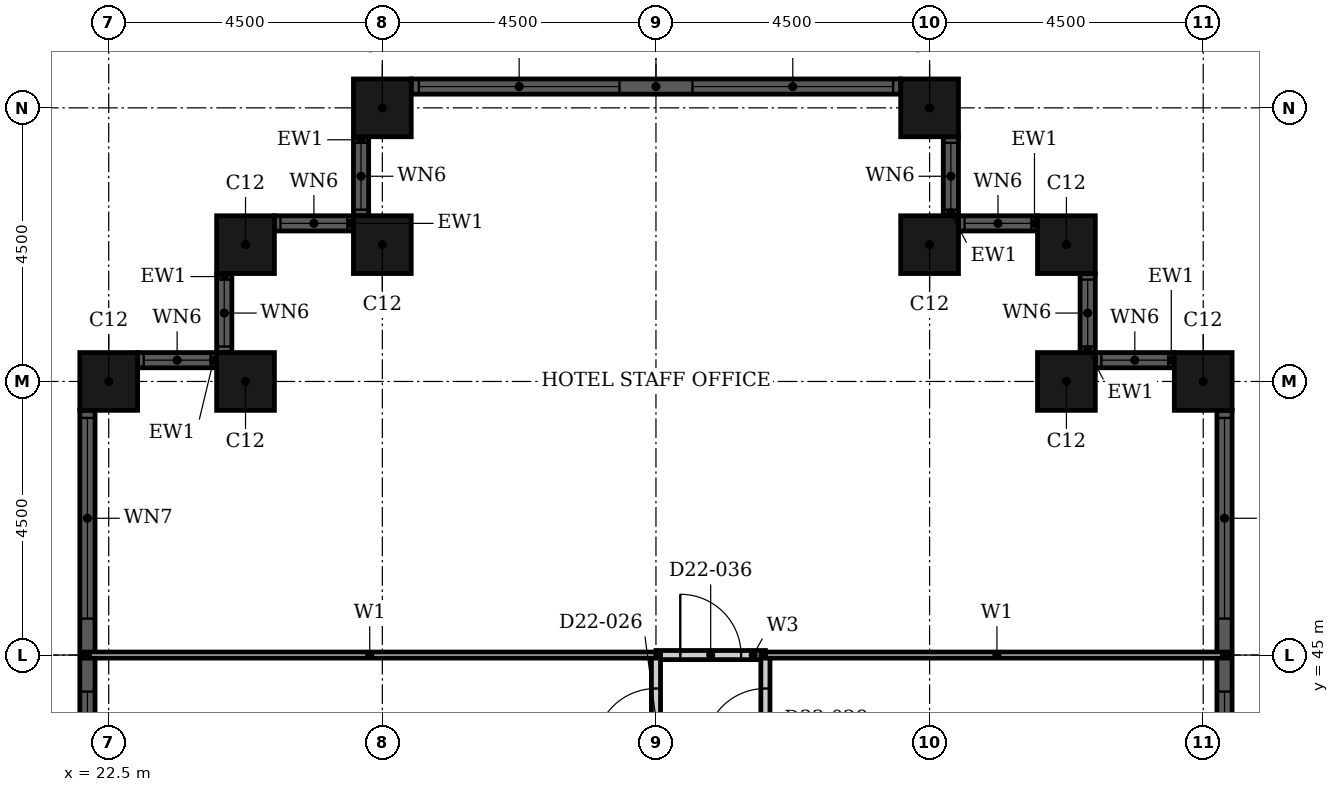
"""IFC4 building model, lengths in metres.
Left out: names, types, materials, properties, quantities, classifications, styles, units other than length and angle.
Written with IfcOpenShell. Run it as: python <this file> out.ifc"""

import sys

from ifc_helpers import new_model, si_unit, direction, frame, frame_2d, origin, origin_2d, place, context, subcontext, project, spatial, rectangle, hollow_rectangle, extrude, element, fill, save


model = new_model("IFC4")
c1 = context("Model", 3, precision=1e-05, world=origin(), true_north=direction((0.0, 1.0)))
c2 = subcontext(c1, "Body", "Model", "MODEL_VIEW")
j1 = project(units=[si_unit("LENGTHUNIT", "METRE"), si_unit("PLANEANGLEUNIT", "RADIAN")], contexts=[c1])
p1 = place(None, origin())
s1 = spatial("IfcSite", under=j1, at=p1, CompositionType="ELEMENT")
p2 = place(p1, origin())
s2 = spatial("IfcBuilding", under=s1, at=p2, CompositionType="ELEMENT")
p3 = place(p2, frame((0.0, 0.0, 92.4)))
s3 = spatial("IfcBuildingStorey", under=s2, at=p3, CompositionType="ELEMENT", Elevation=92.4)
for number, where, z_axis, x_axis in (
    (1, (40.5, 49.5, 0.0), (0.0, 0.0, 1.0), (1.0, 0.0, 0.0)),
    (2, (38.25, 49.5, 0.0), (0.0, 0.0, 1.0), (1.0, 0.0, 0.0)),
    (3, (38.25, 51.75, 0.0), (0.0, 0.0, 1.0), (1.0, 0.0, 0.0)),
    (4, (36.0, 51.75, 0.0), (0.0, 0.0, 1.0), (1.0, 0.0, 0.0)),
    (5, (36.0, 54.0, 0.0), (0.0, 0.0, 1.0), (1.0, 0.0, 0.0)),
    (6, (27.0, 54.0, 0.0), (0.0, 0.0, 1.0), (1.0, 0.0, 0.0)),
    (7, (27.0, 51.75, 0.0), (0.0, 0.0, 1.0), (1.0, 0.0, 0.0)),
    (8, (24.75, 51.75, 0.0), (0.0, 0.0, 1.0), (1.0, 0.0, 0.0)),
    (9, (24.75, 49.5, 0.0), (0.0, 0.0, 1.0), (1.0, 0.0, 0.0)),
    (10, (22.5, 49.5, 0.0), (0.0, 0.0, 1.0), (1.0, 0.0, 0.0)),
):
    element("IfcColumn", number, at=place(p3, frame(where, z_axis=z_axis, x_axis=x_axis)), inside=s3, PredefinedType="COLUMN", context=c2, shape_type="SweptSolid", body=[
        extrude(hollow_rectangle(XDim=0.95, YDim=0.95, WallThickness=0.03, at=origin_2d()), origin(), (0.0, 0.0, 1.0), 3.6),
    ])
p4 = place(p3, frame((40.85, 40.975, 0.0), z_axis=(0.0, 0.0, 1.0), x_axis=(0.0, 1.0, 0.0)))
e11 = element("IfcWall", 11, at=p4, inside=s3, PredefinedType="SOLIDWALL", context=c2, shape_type="SweptSolid", body=[
    extrude(rectangle(XDim=8.05, YDim=0.25, at=frame_2d((4.025, 0.0))), origin(), (0.0, 0.0, 1.0), 3.6),
])
p5 = place(p4, frame((0.125, 0.0, 0.9)))
e12 = element("IfcOpeningElement", 12, at=p5, cuts=e11, PredefinedType="OPENING", context=c2, shape_type="SweptSolid", body=[
    extrude(rectangle(XDim=3.3, YDim=1.85, at=frame_2d((1.65, 0.925))), frame((0.0, 0.135, 0.0), z_axis=(0.0, -1.0, 0.0), x_axis=(1.0, 0.0, 0.0)), (0.0, 0.0, 1.0), 0.27),
])
p6 = place(p4, frame((4.625, 0.0, 0.9)))
e13 = element("IfcOpeningElement", 13, at=p6, cuts=e11, PredefinedType="OPENING", context=c2, shape_type="SweptSolid", body=[
    extrude(rectangle(XDim=3.3, YDim=1.85, at=frame_2d((1.65, 0.925))), frame((0.0, 0.135, 0.0), z_axis=(0.0, -1.0, 0.0), x_axis=(1.0, 0.0, 0.0)), (0.0, 0.0, 1.0), 0.27),
])
p7 = place(p3, frame((40.025, 49.85, 0.0), z_axis=(0.0, 0.0, 1.0), x_axis=(-1.0, 0.0, 0.0)))
e14 = element("IfcWall", 14, at=p7, inside=s3, PredefinedType="SOLIDWALL", context=c2, shape_type="SweptSolid", body=[
    extrude(rectangle(XDim=1.3, YDim=0.25, at=frame_2d((0.65, 0.0))), origin(), (0.0, 0.0, 1.0), 3.6),
])
p8 = place(p7, frame((0.1, 0.0, 0.9)))
e15 = element("IfcOpeningElement", 15, at=p8, cuts=e14, PredefinedType="OPENING", context=c2, shape_type="SweptSolid", body=[
    extrude(rectangle(XDim=1.1, YDim=1.85, at=frame_2d((0.55, 0.925))), frame((0.0, 0.135, 0.0), z_axis=(0.0, -1.0, 0.0), x_axis=(1.0, 0.0, 0.0)), (0.0, 0.0, 1.0), 0.27),
])
p9 = place(p3, frame((38.6, 49.975, 0.0), z_axis=(0.0, 0.0, 1.0), x_axis=(0.0, 1.0, 0.0)))
e16 = element("IfcWall", 16, at=p9, inside=s3, PredefinedType="SOLIDWALL", context=c2, shape_type="SweptSolid", body=[
    extrude(rectangle(XDim=1.3, YDim=0.25, at=frame_2d((0.65, 0.0))), origin(), (0.0, 0.0, 1.0), 3.6),
])
p10 = place(p9, frame((0.1, 0.0, 0.9)))
e17 = element("IfcOpeningElement", 17, at=p10, cuts=e16, PredefinedType="OPENING", context=c2, shape_type="SweptSolid", body=[
    extrude(rectangle(XDim=1.1, YDim=1.85, at=frame_2d((0.55, 0.925))), frame((0.0, 0.135, 0.0), z_axis=(0.0, -1.0, 0.0), x_axis=(1.0, 0.0, 0.0)), (0.0, 0.0, 1.0), 0.27),
])
p11 = place(p3, frame((37.775, 52.1, 0.0), z_axis=(0.0, 0.0, 1.0), x_axis=(-1.0, 0.0, 0.0)))
e18 = element("IfcWall", 18, at=p11, inside=s3, PredefinedType="SOLIDWALL", context=c2, shape_type="SweptSolid", body=[
    extrude(rectangle(XDim=1.3, YDim=0.25, at=frame_2d((0.65, 0.0))), origin(), (0.0, 0.0, 1.0), 3.6),
])
p12 = place(p11, frame((0.1, 0.0, 0.9)))
e19 = element("IfcOpeningElement", 19, at=p12, cuts=e18, PredefinedType="OPENING", context=c2, shape_type="SweptSolid", body=[
    extrude(rectangle(XDim=1.1, YDim=1.85, at=frame_2d((0.55, 0.925))), frame((0.0, 0.135, 0.0), z_axis=(0.0, -1.0, 0.0), x_axis=(1.0, 0.0, 0.0)), (0.0, 0.0, 1.0), 0.27),
])
p13 = place(p3, frame((36.35, 52.225, 0.0), z_axis=(0.0, 0.0, 1.0), x_axis=(0.0, 1.0, 0.0)))
e20 = element("IfcWall", 20, at=p13, inside=s3, PredefinedType="SOLIDWALL", context=c2, shape_type="SweptSolid", body=[
    extrude(rectangle(XDim=1.3, YDim=0.25, at=frame_2d((0.65, 0.0))), origin(), (0.0, 0.0, 1.0), 3.6),
])
p14 = place(p13, frame((0.1, 0.0, 0.9)))
e21 = element("IfcOpeningElement", 21, at=p14, cuts=e20, PredefinedType="OPENING", context=c2, shape_type="SweptSolid", body=[
    extrude(rectangle(XDim=1.1, YDim=1.85, at=frame_2d((0.55, 0.925))), frame((0.0, 0.135, 0.0), z_axis=(0.0, -1.0, 0.0), x_axis=(1.0, 0.0, 0.0)), (0.0, 0.0, 1.0), 0.27),
])
p15 = place(p3, frame((35.525, 54.35, 0.0), z_axis=(0.0, 0.0, 1.0), x_axis=(-1.0, 0.0, 0.0)))
e22 = element("IfcWall", 22, at=p15, inside=s3, PredefinedType="SOLIDWALL", context=c2, shape_type="SweptSolid", body=[
    extrude(rectangle(XDim=8.05, YDim=0.25, at=frame_2d((4.025, 0.0))), origin(), (0.0, 0.0, 1.0), 3.6),
])
p16 = place(p15, frame((0.125, 0.0, 0.9)))
e23 = element("IfcOpeningElement", 23, at=p16, cuts=e22, PredefinedType="OPENING", context=c2, shape_type="SweptSolid", body=[
    extrude(rectangle(XDim=3.3, YDim=1.85, at=frame_2d((1.65, 0.925))), frame((0.0, 0.135, 0.0), z_axis=(0.0, -1.0, 0.0), x_axis=(1.0, 0.0, 0.0)), (0.0, 0.0, 1.0), 0.27),
])
p17 = place(p15, frame((4.625, 0.0, 0.9)))
e24 = element("IfcOpeningElement", 24, at=p17, cuts=e22, PredefinedType="OPENING", context=c2, shape_type="SweptSolid", body=[
    extrude(rectangle(XDim=3.3, YDim=1.85, at=frame_2d((1.65, 0.925))), frame((0.0, 0.135, 0.0), z_axis=(0.0, -1.0, 0.0), x_axis=(1.0, 0.0, 0.0)), (0.0, 0.0, 1.0), 0.27),
])
p18 = place(p3, frame((26.65, 53.525, 0.0), z_axis=(0.0, 0.0, 1.0), x_axis=(0.0, -1.0, 0.0)))
e25 = element("IfcWall", 25, at=p18, inside=s3, PredefinedType="SOLIDWALL", context=c2, shape_type="SweptSolid", body=[
    extrude(rectangle(XDim=1.3, YDim=0.25, at=frame_2d((0.65, 0.0))), origin(), (0.0, 0.0, 1.0), 3.6),
])
p19 = place(p18, frame((0.1, 0.0, 0.9)))
e26 = element("IfcOpeningElement", 26, at=p19, cuts=e25, PredefinedType="OPENING", context=c2, shape_type="SweptSolid", body=[
    extrude(rectangle(XDim=1.1, YDim=1.85, at=frame_2d((0.55, 0.925))), frame((0.0, 0.135, 0.0), z_axis=(0.0, -1.0, 0.0), x_axis=(1.0, 0.0, 0.0)), (0.0, 0.0, 1.0), 0.27),
])
p20 = place(p3, frame((26.525, 52.1, 0.0), z_axis=(0.0, 0.0, 1.0), x_axis=(-1.0, 0.0, 0.0)))
e27 = element("IfcWall", 27, at=p20, inside=s3, PredefinedType="SOLIDWALL", context=c2, shape_type="SweptSolid", body=[
    extrude(rectangle(XDim=1.3, YDim=0.25, at=frame_2d((0.65, 0.0))), origin(), (0.0, 0.0, 1.0), 3.6),
])
p21 = place(p20, frame((0.1, 0.0, 0.9)))
e28 = element("IfcOpeningElement", 28, at=p21, cuts=e27, PredefinedType="OPENING", context=c2, shape_type="SweptSolid", body=[
    extrude(rectangle(XDim=1.1, YDim=1.85, at=frame_2d((0.55, 0.925))), frame((0.0, 0.135, 0.0), z_axis=(0.0, -1.0, 0.0), x_axis=(1.0, 0.0, 0.0)), (0.0, 0.0, 1.0), 0.27),
])
p22 = place(p3, frame((24.4, 51.275, 0.0), z_axis=(0.0, 0.0, 1.0), x_axis=(0.0, -1.0, 0.0)))
e29 = element("IfcWall", 29, at=p22, inside=s3, PredefinedType="SOLIDWALL", context=c2, shape_type="SweptSolid", body=[
    extrude(rectangle(XDim=1.3, YDim=0.25, at=frame_2d((0.65, 0.0))), origin(), (0.0, 0.0, 1.0), 3.6),
])
p23 = place(p22, frame((0.1, 0.0, 0.9)))
e30 = element("IfcOpeningElement", 30, at=p23, cuts=e29, PredefinedType="OPENING", context=c2, shape_type="SweptSolid", body=[
    extrude(rectangle(XDim=1.1, YDim=1.85, at=frame_2d((0.55, 0.925))), frame((0.0, 0.135, 0.0), z_axis=(0.0, -1.0, 0.0), x_axis=(1.0, 0.0, 0.0)), (0.0, 0.0, 1.0), 0.27),
])
p24 = place(p3, frame((24.275, 49.85, 0.0), z_axis=(0.0, 0.0, 1.0), x_axis=(-1.0, 0.0, 0.0)))
e31 = element("IfcWall", 31, at=p24, inside=s3, PredefinedType="SOLIDWALL", context=c2, shape_type="SweptSolid", body=[
    extrude(rectangle(XDim=1.3, YDim=0.25, at=frame_2d((0.65, 0.0))), origin(), (0.0, 0.0, 1.0), 3.6),
])
p25 = place(p24, frame((0.1, 0.0, 0.9)))
e32 = element("IfcOpeningElement", 32, at=p25, cuts=e31, PredefinedType="OPENING", context=c2, shape_type="SweptSolid", body=[
    extrude(rectangle(XDim=1.1, YDim=1.85, at=frame_2d((0.55, 0.925))), frame((0.0, 0.135, 0.0), z_axis=(0.0, -1.0, 0.0), x_axis=(1.0, 0.0, 0.0)), (0.0, 0.0, 1.0), 0.27),
])
p26 = place(p3, frame((22.15, 49.025, 0.0), z_axis=(0.0, 0.0, 1.0), x_axis=(0.0, -1.0, 0.0)))
e33 = element("IfcWall", 33, at=p26, inside=s3, PredefinedType="SOLIDWALL", context=c2, shape_type="SweptSolid", body=[
    extrude(rectangle(XDim=8.05, YDim=0.25, at=frame_2d((4.025, 0.0))), origin(), (0.0, 0.0, 1.0), 3.6),
])
p27 = place(p26, frame((0.125, 0.0, 0.9)))
e34 = element("IfcOpeningElement", 34, at=p27, cuts=e33, PredefinedType="OPENING", context=c2, shape_type="SweptSolid", body=[
    extrude(rectangle(XDim=3.3, YDim=1.85, at=frame_2d((1.65, 0.925))), frame((0.0, 0.135, 0.0), z_axis=(0.0, -1.0, 0.0), x_axis=(1.0, 0.0, 0.0)), (0.0, 0.0, 1.0), 0.27),
])
p28 = place(p26, frame((4.625, 0.0, 0.9)))
e35 = element("IfcOpeningElement", 35, at=p28, cuts=e33, PredefinedType="OPENING", context=c2, shape_type="SweptSolid", body=[
    extrude(rectangle(XDim=3.3, YDim=1.85, at=frame_2d((1.65, 0.925))), frame((0.0, 0.135, 0.0), z_axis=(0.0, -1.0, 0.0), x_axis=(1.0, 0.0, 0.0)), (0.0, 0.0, 1.0), 0.27),
])
p29 = place(p3, frame((31.5, 45.0, 0.0), z_axis=(0.0, 0.0, 1.0), x_axis=(1.0, 0.0, 0.0)))
e36 = element("IfcWall", 36, at=p29, inside=s3, PredefinedType="PARTITIONING", context=c2, shape_type="SweptSolid", body=[
    extrude(rectangle(XDim=1.8, YDim=0.15, at=frame_2d((0.9, 0.0))), origin(), (0.0, 0.0, 1.0), 3.2),
])
p30 = place(p29, frame((0.4, 0.0, 0.0)))
e37 = element("IfcOpeningElement", 37, at=p30, cuts=e36, PredefinedType="OPENING", context=c2, shape_type="SweptSolid", body=[
    extrude(rectangle(XDim=1.0, YDim=2.1, at=frame_2d((0.5, 1.05))), frame((0.0, 0.085, 0.0), z_axis=(0.0, -1.0, 0.0), x_axis=(1.0, 0.0, 0.0)), (0.0, 0.0, 1.0), 0.17),
])
p31 = place(p3, frame((31.5, 33.3, 0.0), z_axis=(0.0, 0.0, 1.0), x_axis=(0.0, 1.0, 0.0)))
e38 = element("IfcWall", 38, at=p31, inside=s3, PredefinedType="PARTITIONING", context=c2, shape_type="SweptSolid", body=[
    extrude(rectangle(XDim=11.7, YDim=0.15, at=frame_2d((5.85, 0.0))), origin(), (0.0, 0.0, 1.0), 2.48),
])
p32 = place(p31, frame((10.15, 0.0, 0.0)))
e39 = element("IfcOpeningElement", 39, at=p32, cuts=e38, PredefinedType="OPENING", context=c2, shape_type="SweptSolid", body=[
    extrude(rectangle(XDim=1.0, YDim=2.1, at=frame_2d((0.5, 1.05))), frame((0.0, 0.085, 0.0), z_axis=(0.0, -1.0, 0.0), x_axis=(1.0, 0.0, 0.0)), (0.0, 0.0, 1.0), 0.17),
])
p33 = place(p3, frame((33.3, 33.3, 0.0), z_axis=(0.0, 0.0, 1.0), x_axis=(0.0, 1.0, 0.0)))
e40 = element("IfcWall", 40, at=p33, inside=s3, PredefinedType="PARTITIONING", context=c2, shape_type="SweptSolid", body=[
    extrude(rectangle(XDim=11.7, YDim=0.15, at=frame_2d((5.85, 0.0))), origin(), (0.0, 0.0, 1.0), 3.2),
])
p34 = place(p33, frame((10.15, 0.0, 0.0)))
e41 = element("IfcOpeningElement", 41, at=p34, cuts=e40, PredefinedType="OPENING", context=c2, shape_type="SweptSolid", body=[
    extrude(rectangle(XDim=1.0, YDim=2.1, at=frame_2d((0.5, 1.05))), frame((0.0, 0.085, 0.0), z_axis=(0.0, -1.0, 0.0), x_axis=(1.0, 0.0, 0.0)), (0.0, 0.0, 1.0), 0.17),
])
p35 = place(p3, frame((33.3, 45.0, 0.0), z_axis=(0.0, 0.0, 1.0), x_axis=(1.0, 0.0, 0.0)))
e42 = element("IfcWall", 42, at=p35, inside=s3, PredefinedType="PARTITIONING", context=c2, shape_type="SweptSolid", body=[
    extrude(rectangle(XDim=7.615, YDim=0.1, at=frame_2d((3.808, 0.0))), origin(), (0.0, 0.0, 1.0), 3.2),
])
p36 = place(p3, frame((22.085, 45.0, 0.0), z_axis=(0.0, 0.0, 1.0), x_axis=(1.0, 0.0, 0.0)))
e43 = element("IfcWall", 43, at=p36, inside=s3, PredefinedType="PARTITIONING", context=c2, shape_type="SweptSolid", body=[
    extrude(rectangle(XDim=9.415, YDim=0.1, at=frame_2d((4.708, 0.0))), origin(), (0.0, 0.0, 1.0), 3.2),
])
p37 = place(p5, origin())
e44 = element("IfcWindow", 44, at=p37, inside=s3, PartitioningType="SINGLE_PANEL", PredefinedType="WINDOW", context=c2, shape_type="SweptSolid", body=[
    extrude(rectangle(XDim=3.3, YDim=1.85, at=frame_2d((1.65, 0.925))), frame((0.0, 0.03, 0.0), z_axis=(0.0, -1.0, 0.0), x_axis=(1.0, 0.0, 0.0)), (0.0, 0.0, 1.0), 0.06),
])
fill(e12, e44)
p38 = place(p6, origin())
e45 = element("IfcWindow", 45, at=p38, inside=s3, PartitioningType="SINGLE_PANEL", PredefinedType="WINDOW", context=c2, shape_type="SweptSolid", body=[
    extrude(rectangle(XDim=3.3, YDim=1.85, at=frame_2d((1.65, 0.925))), frame((0.0, 0.03, 0.0), z_axis=(0.0, -1.0, 0.0), x_axis=(1.0, 0.0, 0.0)), (0.0, 0.0, 1.0), 0.06),
])
fill(e13, e45)
p39 = place(p8, origin())
e46 = element("IfcWindow", 46, at=p39, inside=s3, PartitioningType="SINGLE_PANEL", PredefinedType="WINDOW", context=c2, shape_type="SweptSolid", body=[
    extrude(rectangle(XDim=1.1, YDim=1.85, at=frame_2d((0.55, 0.925))), frame((0.0, 0.03, 0.0), z_axis=(0.0, -1.0, 0.0), x_axis=(1.0, 0.0, 0.0)), (0.0, 0.0, 1.0), 0.06),
])
fill(e15, e46)
p40 = place(p10, origin())
e47 = element("IfcWindow", 47, at=p40, inside=s3, PartitioningType="SINGLE_PANEL", PredefinedType="WINDOW", context=c2, shape_type="SweptSolid", body=[
    extrude(rectangle(XDim=1.1, YDim=1.85, at=frame_2d((0.55, 0.925))), frame((0.0, 0.03, 0.0), z_axis=(0.0, -1.0, 0.0), x_axis=(1.0, 0.0, 0.0)), (0.0, 0.0, 1.0), 0.06),
])
fill(e17, e47)
p41 = place(p12, origin())
e48 = element("IfcWindow", 48, at=p41, inside=s3, PartitioningType="SINGLE_PANEL", PredefinedType="WINDOW", context=c2, shape_type="SweptSolid", body=[
    extrude(rectangle(XDim=1.1, YDim=1.85, at=frame_2d((0.55, 0.925))), frame((0.0, 0.03, 0.0), z_axis=(0.0, -1.0, 0.0), x_axis=(1.0, 0.0, 0.0)), (0.0, 0.0, 1.0), 0.06),
])
fill(e19, e48)
p42 = place(p14, origin())
e49 = element("IfcWindow", 49, at=p42, inside=s3, PartitioningType="SINGLE_PANEL", PredefinedType="WINDOW", context=c2, shape_type="SweptSolid", body=[
    extrude(rectangle(XDim=1.1, YDim=1.85, at=frame_2d((0.55, 0.925))), frame((0.0, 0.03, 0.0), z_axis=(0.0, -1.0, 0.0), x_axis=(1.0, 0.0, 0.0)), (0.0, 0.0, 1.0), 0.06),
])
fill(e21, e49)
p43 = place(p16, origin())
e50 = element("IfcWindow", 50, at=p43, inside=s3, PartitioningType="SINGLE_PANEL", PredefinedType="WINDOW", context=c2, shape_type="SweptSolid", body=[
    extrude(rectangle(XDim=3.3, YDim=1.85, at=frame_2d((1.65, 0.925))), frame((0.0, 0.03, 0.0), z_axis=(0.0, -1.0, 0.0), x_axis=(1.0, 0.0, 0.0)), (0.0, 0.0, 1.0), 0.06),
])
fill(e23, e50)
p44 = place(p17, origin())
e51 = element("IfcWindow", 51, at=p44, inside=s3, PartitioningType="SINGLE_PANEL", PredefinedType="WINDOW", context=c2, shape_type="SweptSolid", body=[
    extrude(rectangle(XDim=3.3, YDim=1.85, at=frame_2d((1.65, 0.925))), frame((0.0, 0.03, 0.0), z_axis=(0.0, -1.0, 0.0), x_axis=(1.0, 0.0, 0.0)), (0.0, 0.0, 1.0), 0.06),
])
fill(e24, e51)
p45 = place(p19, origin())
e52 = element("IfcWindow", 52, at=p45, inside=s3, PartitioningType="SINGLE_PANEL", PredefinedType="WINDOW", context=c2, shape_type="SweptSolid", body=[
    extrude(rectangle(XDim=1.1, YDim=1.85, at=frame_2d((0.55, 0.925))), frame((0.0, 0.03, 0.0), z_axis=(0.0, -1.0, 0.0), x_axis=(1.0, 0.0, 0.0)), (0.0, 0.0, 1.0), 0.06),
])
fill(e26, e52)
p46 = place(p21, origin())
e53 = element("IfcWindow", 53, at=p46, inside=s3, PartitioningType="SINGLE_PANEL", PredefinedType="WINDOW", context=c2, shape_type="SweptSolid", body=[
    extrude(rectangle(XDim=1.1, YDim=1.85, at=frame_2d((0.55, 0.925))), frame((0.0, 0.03, 0.0), z_axis=(0.0, -1.0, 0.0), x_axis=(1.0, 0.0, 0.0)), (0.0, 0.0, 1.0), 0.06),
])
fill(e28, e53)
p47 = place(p23, origin())
e54 = element("IfcWindow", 54, at=p47, inside=s3, PartitioningType="SINGLE_PANEL", PredefinedType="WINDOW", context=c2, shape_type="SweptSolid", body=[
    extrude(rectangle(XDim=1.1, YDim=1.85, at=frame_2d((0.55, 0.925))), frame((0.0, 0.03, 0.0), z_axis=(0.0, -1.0, 0.0), x_axis=(1.0, 0.0, 0.0)), (0.0, 0.0, 1.0), 0.06),
])
fill(e30, e54)
p48 = place(p25, origin())
e55 = element("IfcWindow", 55, at=p48, inside=s3, PartitioningType="SINGLE_PANEL", PredefinedType="WINDOW", context=c2, shape_type="SweptSolid", body=[
    extrude(rectangle(XDim=1.1, YDim=1.85, at=frame_2d((0.55, 0.925))), frame((0.0, 0.03, 0.0), z_axis=(0.0, -1.0, 0.0), x_axis=(1.0, 0.0, 0.0)), (0.0, 0.0, 1.0), 0.06),
])
fill(e32, e55)
p49 = place(p27, origin())
e56 = element("IfcWindow", 56, at=p49, inside=s3, PartitioningType="SINGLE_PANEL", PredefinedType="WINDOW", context=c2, shape_type="SweptSolid", body=[
    extrude(rectangle(XDim=3.3, YDim=1.85, at=frame_2d((1.65, 0.925))), frame((0.0, 0.03, 0.0), z_axis=(0.0, -1.0, 0.0), x_axis=(1.0, 0.0, 0.0)), (0.0, 0.0, 1.0), 0.06),
])
fill(e34, e56)
p50 = place(p28, origin())
e57 = element("IfcWindow", 57, at=p50, inside=s3, PartitioningType="SINGLE_PANEL", PredefinedType="WINDOW", context=c2, shape_type="SweptSolid", body=[
    extrude(rectangle(XDim=3.3, YDim=1.85, at=frame_2d((1.65, 0.925))), frame((0.0, 0.03, 0.0), z_axis=(0.0, -1.0, 0.0), x_axis=(1.0, 0.0, 0.0)), (0.0, 0.0, 1.0), 0.06),
])
fill(e35, e57)
p51 = place(p32, origin())
e58 = element("IfcDoor", 58, at=p51, inside=s3, OperationType="SINGLE_SWING_RIGHT", PredefinedType="DOOR", context=c2, shape_type="SweptSolid", body=[
    extrude(rectangle(XDim=1.0, YDim=2.1, at=frame_2d((0.5, 1.05))), frame((0.0, 0.025, 0.0), z_axis=(0.0, -1.0, 0.0), x_axis=(1.0, 0.0, 0.0)), (0.0, 0.0, 1.0), 0.05),
])
fill(e39, e58)
p52 = place(p34, origin())
e59 = element("IfcDoor", 59, at=p52, inside=s3, OperationType="SINGLE_SWING_RIGHT", PredefinedType="DOOR", context=c2, shape_type="SweptSolid", body=[
    extrude(rectangle(XDim=1.0, YDim=2.1, at=frame_2d((0.5, 1.05))), frame((0.0, 0.025, 0.0), z_axis=(0.0, -1.0, 0.0), x_axis=(1.0, 0.0, 0.0)), (0.0, 0.0, 1.0), 0.05),
])
fill(e41, e59)
p53 = place(p30, origin())
e60 = element("IfcDoor", 60, at=p53, inside=s3, OperationType="SINGLE_SWING_RIGHT", PredefinedType="DOOR", context=c2, shape_type="SweptSolid", body=[
    extrude(rectangle(XDim=1.0, YDim=2.1, at=frame_2d((0.5, 1.05))), frame((0.0, 0.025, 0.0), z_axis=(0.0, -1.0, 0.0), x_axis=(1.0, 0.0, 0.0)), (0.0, 0.0, 1.0), 0.05),
])
fill(e37, e60)
save(model, sys.argv[1])
